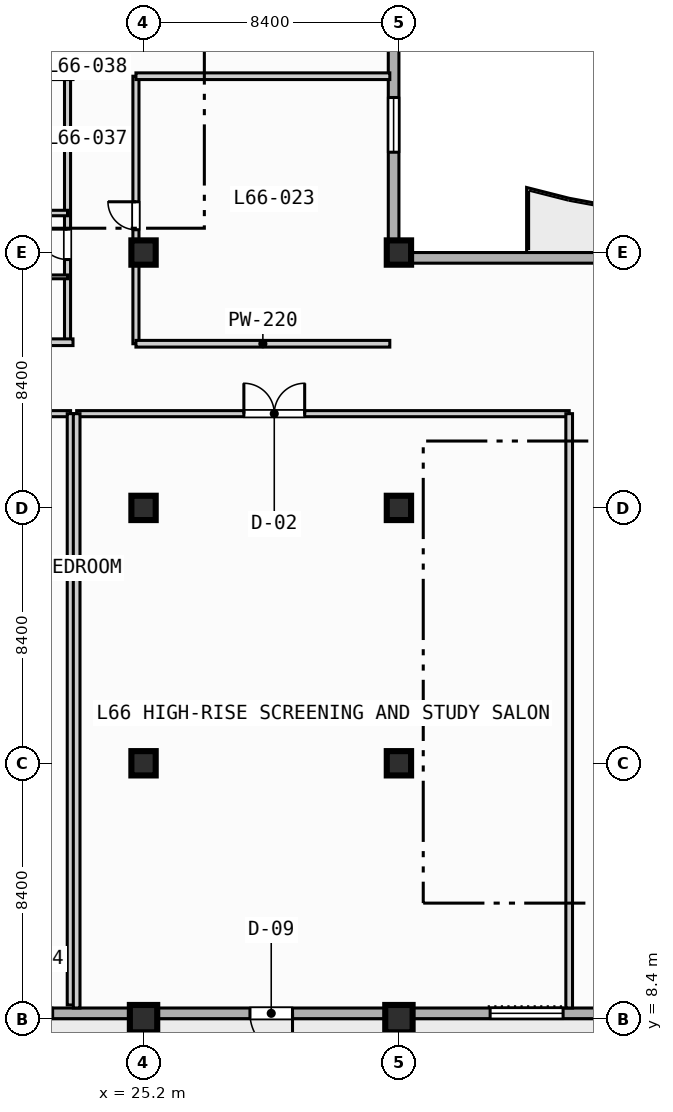
"""IFC4 building model, lengths in metres.
Left out: names, types, materials, properties, quantities, classifications, styles, units other than length and angle.
Written with IfcOpenShell. Run it as: python <this file> out.ifc"""

import sys

from ifc_helpers import new_model, si_unit, direction, frame, frame_2d, origin, origin_2d, place, context, subcontext, project, spatial, rectangle, extrude, element, fill, save


model = new_model("IFC4")
c1 = context("Model", 3, precision=1e-05, world=origin(), true_north=direction((0.0, 1.0)))
c2 = subcontext(c1, "Body", "Model", "MODEL_VIEW")
j1 = project(units=[si_unit("LENGTHUNIT", "METRE"), si_unit("PLANEANGLEUNIT", "RADIAN")], contexts=[c1])
p1 = place(None, origin())
s1 = spatial("IfcSite", under=j1, at=p1, CompositionType="ELEMENT")
p2 = place(p1, origin())
s2 = spatial("IfcBuilding", under=s1, at=p2, CompositionType="ELEMENT")
p3 = place(p2, frame((0.0, 0.0, 267.5)))
s3 = spatial("IfcBuildingStorey", under=s2, at=p3, CompositionType="ELEMENT", Elevation=267.5)
p4 = place(p3, frame((25.2, 8.4, 0.0), z_axis=(0.0, 0.0, 1.0), x_axis=(1.0, 0.0, 0.0)))
e1 = element("IfcColumn", 1, at=p4, inside=s3, PredefinedType="COLUMN", context=c2, shape_type="SweptSolid", body=[
    extrude(rectangle(XDim=0.9, YDim=0.9, at=origin_2d()), origin(), (0.0, 0.0, 1.0), 3.7),
])
for number, where, z_axis, x_axis in (
    (2, (25.2, 16.8, 0.0), (0.0, 0.0, 1.0), (1.0, 0.0, 0.0)),
    (3, (25.2, 25.2, 0.0), (0.0, 0.0, 1.0), (1.0, 0.0, 0.0)),
    (4, (25.2, 33.6, 0.0), (0.0, 0.0, 1.0), (1.0, 0.0, 0.0)),
):
    element("IfcColumn", number, at=place(p3, frame(where, z_axis=z_axis, x_axis=x_axis)), inside=s3, PredefinedType="COLUMN", context=c2, shape_type="SweptSolid", body=[
        extrude(rectangle(XDim=0.8, YDim=0.8, at=origin_2d()), origin(), (0.0, 0.0, 1.0), 3.7),
    ])
p5 = place(p3, frame((33.6, 8.4, 0.0), z_axis=(0.0, 0.0, 1.0), x_axis=(1.0, 0.0, 0.0)))
e5 = element("IfcColumn", 5, at=p5, inside=s3, PredefinedType="COLUMN", context=c2, shape_type="SweptSolid", body=[
    extrude(rectangle(XDim=0.9, YDim=0.9, at=origin_2d()), origin(), (0.0, 0.0, 1.0), 3.7),
])
for number, where, z_axis, x_axis in (
    (6, (33.6, 16.8, 0.0), (0.0, 0.0, 1.0), (1.0, 0.0, 0.0)),
    (7, (33.6, 25.2, 0.0), (0.0, 0.0, 1.0), (1.0, 0.0, 0.0)),
    (8, (33.6, 33.6, 0.0), (0.0, 0.0, 1.0), (1.0, 0.0, 0.0)),
):
    element("IfcColumn", number, at=place(p3, frame(where, z_axis=z_axis, x_axis=x_axis)), inside=s3, PredefinedType="COLUMN", context=c2, shape_type="SweptSolid", body=[
        extrude(rectangle(XDim=0.8, YDim=0.8, at=origin_2d()), origin(), (0.0, 0.0, 1.0), 3.7),
    ])
p6 = place(p3, frame((33.425, 72.425, 0.0), z_axis=(0.0, 0.0, 1.0), x_axis=(0.0, -1.0, 0.0)))
e9 = element("IfcWall", 9, at=p6, inside=s3, PredefinedType="STANDARD", context=c2, shape_type="SweptSolid", body=[
    extrude(rectangle(XDim=39.0, YDim=0.35, at=frame_2d((19.5, 0.0))), origin(), (0.0, 0.0, 1.0), 3.47),
])
p7 = place(p6, frame((33.725, 0.0, 0.85)))
e10 = element("IfcOpeningElement", 10, at=p7, cuts=e9, PredefinedType="OPENING", context=c2, shape_type="SweptSolid", body=[
    extrude(rectangle(XDim=1.8, YDim=1.8, at=frame_2d((0.9, 0.9))), frame((0.0, 0.185, 0.0), z_axis=(0.0, -1.0, 0.0), x_axis=(1.0, 0.0, 0.0)), (0.0, 0.0, 1.0), 0.37),
])
p8 = place(p6, frame((8.225, 0.0, 0.85)))
e11 = element("IfcOpeningElement", 11, at=p8, cuts=e9, PredefinedType="OPENING", context=c2, shape_type="SweptSolid", body=[
    extrude(rectangle(XDim=2.4, YDim=1.95, at=frame_2d((1.2, 0.975))), frame((0.0, 0.185, 0.0), z_axis=(0.0, -1.0, 0.0), x_axis=(1.0, 0.0, 0.0)), (0.0, 0.0, 1.0), 0.37),
])
p9 = place(p3, frame((33.425, 33.425, 0.0), z_axis=(0.0, 0.0, 1.0), x_axis=(1.0, 0.0, 0.0)))
e12 = element("IfcWall", 12, at=p9, inside=s3, PredefinedType="STANDARD", context=c2, shape_type="SweptSolid", body=[
    extrude(rectangle(XDim=39.0, YDim=0.35, at=frame_2d((19.5, 0.0))), origin(), (0.0, 0.0, 1.0), 3.47),
])
p10 = place(p9, frame((12.075, 0.0, 0.0)))
e13 = element("IfcOpeningElement", 13, at=p10, cuts=e12, PredefinedType="OPENING", context=c2, shape_type="SweptSolid", body=[
    extrude(rectangle(XDim=1.4, YDim=2.2, at=frame_2d((0.7, 1.1))), frame((0.0, 0.185, 0.0), z_axis=(0.0, -1.0, 0.0), x_axis=(1.0, 0.0, 0.0)), (0.0, 0.0, 1.0), 0.37),
])
p11 = place(p3, frame((72.425, 8.575, 0.0), z_axis=(0.0, 0.0, 1.0), x_axis=(-1.0, 0.0, 0.0)))
e14 = element("IfcWall", 14, at=p11, inside=s3, PredefinedType="STANDARD", context=c2, shape_type="SweptSolid", body=[
    extrude(rectangle(XDim=60.85, YDim=0.35, at=frame_2d((30.425, 0.0))), origin(), (0.0, 0.0, 1.0), 3.47),
])
p12 = place(p11, frame((42.325, 0.0, 0.0)))
e15 = element("IfcOpeningElement", 15, at=p12, cuts=e14, PredefinedType="OPENING", context=c2, shape_type="SweptSolid", body=[
    extrude(rectangle(XDim=1.4, YDim=2.2, at=frame_2d((0.7, 1.1))), frame((0.0, 0.185, 0.0), z_axis=(0.0, -1.0, 0.0), x_axis=(1.0, 0.0, 0.0)), (0.0, 0.0, 1.0), 0.37),
])
p13 = place(p11, frame((33.425, 0.0, 0.85)))
e16 = element("IfcOpeningElement", 16, at=p13, cuts=e14, PredefinedType="OPENING", context=c2, shape_type="SweptSolid", body=[
    extrude(rectangle(XDim=2.4, YDim=1.95, at=frame_2d((1.2, 0.975))), frame((0.0, 0.185, 0.0), z_axis=(0.0, -1.0, 0.0), x_axis=(1.0, 0.0, 0.0)), (0.0, 0.0, 1.0), 0.37),
])
p14 = place(p11, frame((25.325, 0.0, 0.85)))
e17 = element("IfcOpeningElement", 17, at=p14, cuts=e14, PredefinedType="OPENING", context=c2, shape_type="SweptSolid", body=[
    extrude(rectangle(XDim=1.8, YDim=1.8, at=frame_2d((0.9, 0.9))), frame((0.0, 0.185, 0.0), z_axis=(0.0, -1.0, 0.0), x_axis=(1.0, 0.0, 0.0)), (0.0, 0.0, 1.0), 0.37),
])
p15 = place(p11, frame((50.215, 0.0, 0.85)))
e18 = element("IfcOpeningElement", 18, at=p15, cuts=e14, PredefinedType="OPENING", context=c2, shape_type="SweptSolid", body=[
    extrude(rectangle(XDim=1.8, YDim=1.8, at=frame_2d((0.9, 0.9))), frame((0.0, 0.185, 0.0), z_axis=(0.0, -1.0, 0.0), x_axis=(1.0, 0.0, 0.0)), (0.0, 0.0, 1.0), 0.37),
])
p16 = place(p11, frame((57.935, 0.0, 0.85)))
e19 = element("IfcOpeningElement", 19, at=p16, cuts=e14, PredefinedType="OPENING", context=c2, shape_type="SweptSolid", body=[
    extrude(rectangle(XDim=1.8, YDim=1.8, at=frame_2d((0.9, 0.9))), frame((0.0, 0.185, 0.0), z_axis=(0.0, -1.0, 0.0), x_axis=(1.0, 0.0, 0.0)), (0.0, 0.0, 1.0), 0.37),
])
p17 = place(p3, frame((24.95, 30.6, 0.0), z_axis=(0.0, 0.0, 1.0), x_axis=(0.0, 1.0, 0.0)))
e20 = element("IfcWall", 20, at=p17, inside=s3, PredefinedType="PARTITIONING", context=c2, shape_type="SweptSolid", body=[
    extrude(rectangle(XDim=8.8, YDim=0.2, at=frame_2d((4.4, 0.0))), origin(), (0.0, 0.0, 1.0), 2.82),
])
p18 = place(p17, frame((3.75, 0.0, 0.0)))
e21 = element("IfcOpeningElement", 21, at=p18, cuts=e20, PredefinedType="OPENING", context=c2, shape_type="SweptSolid", body=[
    extrude(rectangle(XDim=0.92, YDim=2.1, at=frame_2d((0.46, 1.05))), frame((0.0, 0.11, 0.0), z_axis=(0.0, -1.0, 0.0), x_axis=(1.0, 0.0, 0.0)), (0.0, 0.0, 1.0), 0.22),
])
for number, where, z_axis, x_axis in (
    (22, (24.95, 30.6, 0.0), (0.0, 0.0, 1.0), (1.0, 0.0, 0.0)),
    (23, (24.95, 39.4, 0.0), (0.0, 0.0, 1.0), (1.0, 0.0, 0.0)),
):
    element("IfcWall", number, at=place(p3, frame(where, z_axis=z_axis, x_axis=x_axis)), inside=s3, PredefinedType="PARTITIONING", context=c2, shape_type="SweptSolid", body=[
        extrude(rectangle(XDim=8.35, YDim=0.22, at=frame_2d((4.175, 0.0))), origin(), (0.0, 0.0, 1.0), 3.47),
    ])
p19 = place(p3, frame((11.8, 28.3, 0.0), z_axis=(0.0, 0.0, 1.0), x_axis=(1.0, 0.0, 0.0)))
e24 = element("IfcWall", 24, at=p19, inside=s3, PredefinedType="PARTITIONING", context=c2, shape_type="SweptSolid", body=[
    extrude(rectangle(XDim=11.0, YDim=0.2, at=frame_2d((5.5, 0.0))), origin(), (0.0, 0.0, 1.0), 3.47),
])
p20 = place(p19, frame((4.05, 0.0, 0.0)))
e25 = element("IfcOpeningElement", 25, at=p20, cuts=e24, PredefinedType="OPENING", context=c2, shape_type="SweptSolid", body=[
    extrude(rectangle(XDim=1.0, YDim=2.15, at=frame_2d((0.5, 1.075))), frame((0.0, 0.11, 0.0), z_axis=(0.0, -1.0, 0.0), x_axis=(1.0, 0.0, 0.0)), (0.0, 0.0, 1.0), 0.22),
])
p21 = place(p3, frame((22.8, 8.85, 0.0), z_axis=(0.0, 0.0, 1.0), x_axis=(0.0, 1.0, 0.0)))
e26 = element("IfcWall", 26, at=p21, inside=s3, PredefinedType="PARTITIONING", context=c2, shape_type="SweptSolid", body=[
    extrude(rectangle(XDim=19.45, YDim=0.22, at=frame_2d((9.725, 0.0))), origin(), (0.0, 0.0, 1.0), 3.47),
])
p22 = place(p3, frame((23.0, 28.3, 0.0), z_axis=(0.0, 0.0, 1.0), x_axis=(1.0, 0.0, 0.0)))
e27 = element("IfcWall", 27, at=p22, inside=s3, PredefinedType="PARTITIONING", context=c2, shape_type="SweptSolid", body=[
    extrude(rectangle(XDim=16.2, YDim=0.2, at=frame_2d((8.1, 0.0))), origin(), (0.0, 0.0, 1.0), 3.47),
])
p23 = place(p22, frame((5.5, 0.0, 0.0)))
e28 = element("IfcOpeningElement", 28, at=p23, cuts=e27, PredefinedType="OPENING", context=c2, shape_type="SweptSolid", body=[
    extrude(rectangle(XDim=2.0, YDim=2.15, at=frame_2d((1.0, 1.075))), frame((0.0, 0.11, 0.0), z_axis=(0.0, -1.0, 0.0), x_axis=(1.0, 0.0, 0.0)), (0.0, 0.0, 1.0), 0.22),
])
for number, where, z_axis, x_axis in (
    (29, (23.0, 8.75, 0.0), (0.0, 0.0, 1.0), (0.0, 1.0, 0.0)),
    (30, (39.2, 8.75, 0.0), (0.0, 0.0, 1.0), (0.0, 1.0, 0.0)),
):
    element("IfcWall", number, at=place(p3, frame(where, z_axis=z_axis, x_axis=x_axis)), inside=s3, PredefinedType="PARTITIONING", context=c2, shape_type="SweptSolid", body=[
        extrude(rectangle(XDim=19.55, YDim=0.22, at=frame_2d((9.775, 0.0))), origin(), (0.0, 0.0, 1.0), 3.47),
    ])
p24 = place(p3, frame((22.7, 30.65, 0.0), z_axis=(0.0, 0.0, 1.0), x_axis=(0.0, 1.0, 0.0)))
e31 = element("IfcWall", 31, at=p24, inside=s3, PredefinedType="PARTITIONING", context=c2, shape_type="SweptSolid", body=[
    extrude(rectangle(XDim=8.75, YDim=0.2, at=frame_2d((4.375, 0.0))), origin(), (0.0, 0.0, 1.0), 3.47),
])
p25 = place(p24, frame((2.72, 0.0, 0.0)))
e32 = element("IfcOpeningElement", 32, at=p25, cuts=e31, PredefinedType="OPENING", context=c2, shape_type="SweptSolid", body=[
    extrude(rectangle(XDim=1.0, YDim=2.15, at=frame_2d((0.5, 1.075))), frame((0.0, 0.11, 0.0), z_axis=(0.0, -1.0, 0.0), x_axis=(1.0, 0.0, 0.0)), (0.0, 0.0, 1.0), 0.22),
])
for number, where, z_axis, x_axis in (
    (33, (8.6, 30.65, 0.0), (0.0, 0.0, 1.0), (1.0, 0.0, 0.0)),
    (34, (8.6, 39.4, 0.0), (0.0, 0.0, 1.0), (1.0, 0.0, 0.0)),
):
    element("IfcWall", number, at=place(p3, frame(where, z_axis=z_axis, x_axis=x_axis)), inside=s3, PredefinedType="PARTITIONING", context=c2, shape_type="SweptSolid", body=[
        extrude(rectangle(XDim=14.28, YDim=0.22, at=frame_2d((7.14, 0.0))), origin(), (0.0, 0.0, 1.0), 3.47),
    ])
for number, where, z_axis, x_axis in (
    (35, (20.25, 34.9, 0.0), (0.0, 0.0, 1.0), (1.0, 0.0, 0.0)),
    (36, (20.25, 37.06, 0.0), (0.0, 0.0, 1.0), (1.0, 0.0, 0.0)),
):
    element("IfcWall", number, at=place(p3, frame(where, z_axis=z_axis, x_axis=x_axis)), inside=s3, PredefinedType="PLUMBINGWALL", context=c2, shape_type="SweptSolid", body=[
        extrude(rectangle(XDim=2.45, YDim=0.18, at=frame_2d((1.225, 0.0))), origin(), (0.0, 0.0, 1.0), 3.47),
    ])
p26 = place(p3, frame((8.75, 32.8, 0.0), z_axis=(0.0, 0.0, 1.0), x_axis=(1.0, 0.0, 0.0)))
e37 = element("IfcWall", 37, at=p26, inside=s3, PredefinedType="PARTITIONING", context=c2, shape_type="SweptSolid", body=[
    extrude(rectangle(XDim=13.95, YDim=0.125, at=frame_2d((6.975, 0.0))), origin(), (0.0, 0.0, 1.0), 3.47),
])
p27 = place(p26, frame((5.29, 0.0, 0.0)))
e38 = element("IfcOpeningElement", 38, at=p27, cuts=e37, PredefinedType="OPENING", context=c2, shape_type="SweptSolid", body=[
    extrude(rectangle(XDim=0.92, YDim=2.1, at=frame_2d((0.46, 1.05))), frame((0.0, 0.073, 0.0), z_axis=(0.0, -1.0, 0.0), x_axis=(1.0, 0.0, 0.0)), (0.0, 0.0, 1.0), 0.145),
])
p28 = place(p7, origin())
e39 = element("IfcWindow", 39, at=p28, inside=s3, PartitioningType="SINGLE_PANEL", PredefinedType="WINDOW", context=c2, shape_type="SweptSolid", body=[
    extrude(rectangle(XDim=1.8, YDim=1.8, at=frame_2d((0.9, 0.9))), frame((0.0, 0.03, 0.0), z_axis=(0.0, -1.0, 0.0), x_axis=(1.0, 0.0, 0.0)), (0.0, 0.0, 1.0), 0.06),
])
fill(e10, e39)
p29 = place(p12, origin())
e40 = element("IfcDoor", 40, at=p29, inside=s3, OperationType="SINGLE_SWING_LEFT", PredefinedType="DOOR", context=c2, shape_type="SweptSolid", body=[
    extrude(rectangle(XDim=1.4, YDim=2.2, at=frame_2d((0.7, 1.1))), frame((0.0, 0.025, 0.0), z_axis=(0.0, -1.0, 0.0), x_axis=(1.0, 0.0, 0.0)), (0.0, 0.0, 1.0), 0.05),
])
fill(e15, e40)
p30 = place(p13, origin())
e41 = element("IfcWindow", 41, at=p30, inside=s3, PartitioningType="SINGLE_PANEL", PredefinedType="WINDOW", context=c2, shape_type="SweptSolid", body=[
    extrude(rectangle(XDim=2.4, YDim=1.95, at=frame_2d((1.2, 0.975))), frame((0.0, 0.03, 0.0), z_axis=(0.0, -1.0, 0.0), x_axis=(1.0, 0.0, 0.0)), (0.0, 0.0, 1.0), 0.06),
])
fill(e16, e41)
p31 = place(p15, origin())
e42 = element("IfcWindow", 42, at=p31, inside=s3, PartitioningType="SINGLE_PANEL", PredefinedType="WINDOW", context=c2, shape_type="SweptSolid", body=[
    extrude(rectangle(XDim=1.8, YDim=1.8, at=frame_2d((0.9, 0.9))), frame((0.0, 0.03, 0.0), z_axis=(0.0, -1.0, 0.0), x_axis=(1.0, 0.0, 0.0)), (0.0, 0.0, 1.0), 0.06),
])
fill(e18, e42)
p32 = place(p18, origin())
e43 = element("IfcDoor", 43, at=p32, inside=s3, OperationType="SINGLE_SWING_RIGHT", PredefinedType="DOOR", context=c2, shape_type="SweptSolid", body=[
    extrude(rectangle(XDim=0.92, YDim=2.1, at=frame_2d((0.46, 1.05))), frame((0.0, 0.025, 0.0), z_axis=(0.0, -1.0, 0.0), x_axis=(1.0, 0.0, 0.0)), (0.0, 0.0, 1.0), 0.05),
])
fill(e21, e43)
p33 = place(p23, origin())
e44 = element("IfcDoor", 44, at=p33, inside=s3, OperationType="SINGLE_SWING_LEFT", PredefinedType="DOOR", context=c2, shape_type="SweptSolid", body=[
    extrude(rectangle(XDim=2.0, YDim=2.15, at=frame_2d((1.0, 1.075))), frame((0.0, 0.025, 0.0), z_axis=(0.0, -1.0, 0.0), x_axis=(1.0, 0.0, 0.0)), (0.0, 0.0, 1.0), 0.05),
])
fill(e28, e44)
p34 = place(p25, origin())
e45 = element("IfcDoor", 45, at=p34, inside=s3, OperationType="SINGLE_SWING_RIGHT", PredefinedType="DOOR", context=c2, shape_type="SweptSolid", body=[
    extrude(rectangle(XDim=1.0, YDim=2.15, at=frame_2d((0.5, 1.075))), frame((0.0, 0.025, 0.0), z_axis=(0.0, -1.0, 0.0), x_axis=(1.0, 0.0, 0.0)), (0.0, 0.0, 1.0), 0.05),
])
fill(e32, e45)
save(model, sys.argv[1])
